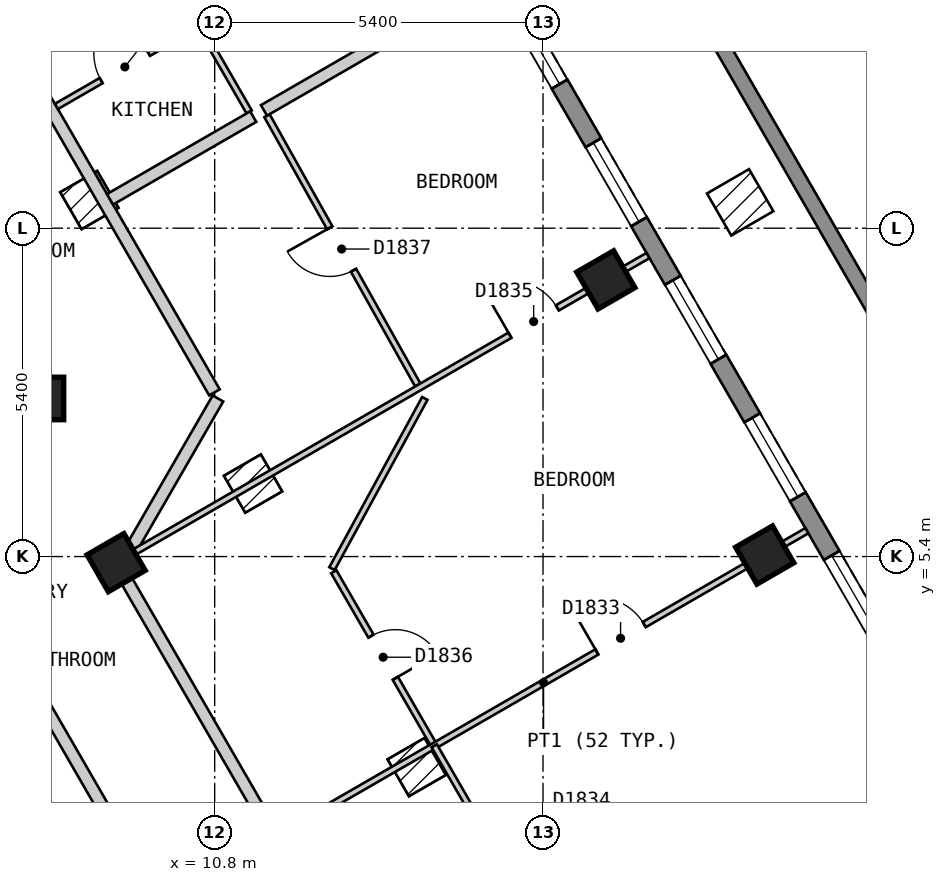
"""IFC4 building model, lengths in metres.
Left out: names, types, materials, properties, quantities, classifications, styles, units other than length and angle.
Written with IfcOpenShell. Run it as: python <this file> out.ifc"""

import sys

from ifc_helpers import new_model, si_unit, direction, frame, frame_2d, origin, origin_2d, place, context, subcontext, project, spatial, polyline, rectangle, outline, extrude, element, fill, save


model = new_model("IFC4")
c1 = context("Model", 3, precision=1e-05, world=origin(), true_north=direction((0.0, 1.0)))
c2 = subcontext(c1, "Body", "Model", "MODEL_VIEW")
j1 = project(units=[si_unit("LENGTHUNIT", "METRE"), si_unit("PLANEANGLEUNIT", "RADIAN")], contexts=[c1])
p1 = place(None, origin())
s1 = spatial("IfcSite", under=j1, at=p1, CompositionType="ELEMENT")
p2 = place(p1, origin())
s2 = spatial("IfcBuilding", under=s1, at=p2, CompositionType="ELEMENT")
p3 = place(p2, frame((0.0, 0.0, 202.8)))
s3 = spatial("IfcBuildingStorey", under=s2, at=p3, CompositionType="ELEMENT", Elevation=202.8)
for number, where, z_axis, x_axis in (
    (1, (19.846, 5.425, 0.0), (0.0, 0.0, 1.0), (-0.5, 0.866, 0.0)),
    (2, (17.233, 9.95, 0.0), (0.0, 0.0, 1.0), (-0.5, 0.866, 0.0)),
    (3, (9.179, 5.3, 0.0), (0.0, 0.0, 1.0), (-0.5, 0.866, 0.0)),
    (4, (7.967, 8.0, 0.0), (0.0, 0.0, 1.0), (1.0, 0.0, 0.0)),
):
    element("IfcColumn", number, at=place(p3, frame(where, z_axis=z_axis, x_axis=x_axis)), inside=s3, PredefinedType="COLUMN", context=c2, shape_type="SweptSolid", body=[
        extrude(rectangle(XDim=0.7, YDim=0.7, at=origin_2d()), origin(), (0.0, 0.0, 1.0), 3.0),
    ])
p4 = place(p3, frame((23.599, 0.825, 0.0), z_axis=(0.0, 0.0, 1.0), x_axis=(-0.500003656944, 0.866023292436, 0.0)))
e5 = element("IfcWall", 5, at=p4, inside=s3, PredefinedType="SOLIDWALL", context=c2, shape_type="SweptSolid", body=[
    extrude(outline(polyline([(0.0, -0.15), (22.17, -0.15), (22.09, 0.15), (0.08, 0.15), (0.0, -0.15)])), origin(), (0.0, 0.0, 1.0), 2.7),
])
p5 = place(p4, frame((1.191, 0.0, 0.15)))
e6 = element("IfcOpeningElement", 6, at=p5, cuts=e5, PredefinedType="OPENING", context=c2, shape_type="SweptSolid", body=[
    extrude(rectangle(XDim=1.5, YDim=2.1, at=frame_2d((0.75, 1.05))), frame((0.0, 0.16, 0.0), z_axis=(0.0, -1.0, 0.0), x_axis=(1.0, 0.0, 0.0)), (0.0, 0.0, 1.0), 0.32),
])
p6 = place(p4, frame((3.804, 0.0, 0.15)))
e7 = element("IfcOpeningElement", 7, at=p6, cuts=e5, PredefinedType="OPENING", context=c2, shape_type="SweptSolid", body=[
    extrude(rectangle(XDim=1.5, YDim=2.1, at=frame_2d((0.75, 1.05))), frame((0.0, 0.16, 0.0), z_axis=(0.0, -1.0, 0.0), x_axis=(1.0, 0.0, 0.0)), (0.0, 0.0, 1.0), 0.32),
])
p7 = place(p4, frame((6.417, 0.0, 0.15)))
e8 = element("IfcOpeningElement", 8, at=p7, cuts=e5, PredefinedType="OPENING", context=c2, shape_type="SweptSolid", body=[
    extrude(rectangle(XDim=1.5, YDim=2.1, at=frame_2d((0.75, 1.05))), frame((0.0, 0.16, 0.0), z_axis=(0.0, -1.0, 0.0), x_axis=(1.0, 0.0, 0.0)), (0.0, 0.0, 1.0), 0.32),
])
p8 = place(p4, frame((9.029, 0.0, 0.15)))
e9 = element("IfcOpeningElement", 9, at=p8, cuts=e5, PredefinedType="OPENING", context=c2, shape_type="SweptSolid", body=[
    extrude(rectangle(XDim=1.5, YDim=2.1, at=frame_2d((0.75, 1.05))), frame((0.0, 0.16, 0.0), z_axis=(0.0, -1.0, 0.0), x_axis=(1.0, 0.0, 0.0)), (0.0, 0.0, 1.0), 0.32),
])
p9 = place(p4, frame((11.641, 0.0, 0.15)))
e10 = element("IfcOpeningElement", 10, at=p9, cuts=e5, PredefinedType="OPENING", context=c2, shape_type="SweptSolid", body=[
    extrude(rectangle(XDim=1.5, YDim=2.1, at=frame_2d((0.75, 1.05))), frame((0.0, 0.16, 0.0), z_axis=(0.0, -1.0, 0.0), x_axis=(1.0, 0.0, 0.0)), (0.0, 0.0, 1.0), 0.32),
])
p10 = place(p4, frame((14.254, 0.0, 0.15)))
e11 = element("IfcOpeningElement", 11, at=p10, cuts=e5, PredefinedType="OPENING", context=c2, shape_type="SweptSolid", body=[
    extrude(rectangle(XDim=1.5, YDim=2.1, at=frame_2d((0.75, 1.05))), frame((0.0, 0.16, 0.0), z_axis=(0.0, -1.0, 0.0), x_axis=(1.0, 0.0, 0.0)), (0.0, 0.0, 1.0), 0.32),
])
p11 = place(p4, frame((16.866, 0.0, 0.15)))
e12 = element("IfcOpeningElement", 12, at=p11, cuts=e5, PredefinedType="OPENING", context=c2, shape_type="SweptSolid", body=[
    extrude(rectangle(XDim=1.5, YDim=2.1, at=frame_2d((0.75, 1.05))), frame((0.0, 0.16, 0.0), z_axis=(0.0, -1.0, 0.0), x_axis=(1.0, 0.0, 0.0)), (0.0, 0.0, 1.0), 0.32),
])
p12 = place(p4, frame((19.479, 0.0, 0.15)))
e13 = element("IfcOpeningElement", 13, at=p12, cuts=e5, PredefinedType="OPENING", context=c2, shape_type="SweptSolid", body=[
    extrude(rectangle(XDim=1.5, YDim=2.1, at=frame_2d((0.75, 1.05))), frame((0.0, 0.16, 0.0), z_axis=(0.0, -1.0, 0.0), x_axis=(1.0, 0.0, 0.0)), (0.0, 0.0, 1.0), 0.32),
])
p13 = place(p3, frame((14.613, 21.637, 0.0), z_axis=(0.0, 0.0, 1.0), x_axis=(0.500061067893, -0.865990143349, 0.0)))
e14 = element("IfcWall", 14, at=p13, inside=s3, PredefinedType="PARAPET", context=c2, shape_type="SweptSolid", body=[
    extrude(outline(polyline([(0.067, -0.125), (22.796, -0.125), (22.863, 0.125), (0.0, 0.125), (0.067, -0.125)])), origin(), (0.0, 0.0, 1.0), 1.6),
])
p14 = place(p3, frame((8.026, 2.899, 0.0), z_axis=(0.0, 0.0, 1.0), x_axis=(0.499986018985, -0.866033475577, 0.0)))
e15 = element("IfcWall", 15, at=p14, inside=s3, PredefinedType="PARTITIONING", context=c2, shape_type="SweptSolid", body=[
    extrude(rectangle(XDim=5.078, YDim=0.2, at=frame_2d((2.539, 0.0))), origin(), (0.0, 0.0, 1.0), 2.7),
])
p15 = place(p14, frame((2.089, 0.0, 0.0)))
e16 = element("IfcOpeningElement", 16, at=p15, cuts=e15, PredefinedType="OPENING", context=c2, shape_type="SweptSolid", body=[
    extrude(rectangle(XDim=0.9, YDim=2.1, at=frame_2d((0.45, 1.05))), frame((0.0, 0.11, 0.0), z_axis=(0.0, -1.0, 0.0), x_axis=(1.0, 0.0, 0.0)), (0.0, 0.0, 1.0), 0.22),
])
p16 = place(p3, frame((9.238, 5.2, 0.0), z_axis=(0.0, 0.0, 1.0), x_axis=(0.500025705601, -0.86601056214, 0.0)))
e17 = element("IfcWall", 17, at=p16, inside=s3, PredefinedType="PARTITIONING", context=c2, shape_type="SweptSolid", body=[
    extrude(rectangle(XDim=7.735, YDim=0.2, at=frame_2d((3.868, 0.0))), origin(), (0.0, 0.0, 1.0), 2.7),
])
p17 = place(p3, frame((5.485, 17.3, 0.0), z_axis=(0.0, 0.0, 1.0), x_axis=(0.499943285704, -0.866058145322, 0.0)))
e18 = element("IfcWall", 18, at=p17, inside=s3, PredefinedType="PARTITIONING", context=c2, shape_type="SweptSolid", body=[
    extrude(rectangle(XDim=10.623, YDim=0.2, at=frame_2d((5.312, 0.0))), origin(), (0.0, 0.0, 1.0), 2.7),
])
p18 = place(p17, frame((3.901, 0.0, 0.0)))
e19 = element("IfcOpeningElement", 19, at=p18, cuts=e18, PredefinedType="OPENING", context=c2, shape_type="SweptSolid", body=[
    extrude(rectangle(XDim=1.0, YDim=2.1, at=frame_2d((0.5, 1.05))), frame((0.0, 0.11, 0.0), z_axis=(0.0, -1.0, 0.0), x_axis=(1.0, 0.0, 0.0)), (0.0, 0.0, 1.0), 0.22),
])
p19 = place(p3, frame((9.404, 5.487, 0.0), z_axis=(0.0, 0.0, 1.0), x_axis=(0.499768590677, 0.866158966803, 0.0)))
e20 = element("IfcWall", 20, at=p19, inside=s3, PredefinedType="PARTITIONING", context=c2, shape_type="SweptSolid", body=[
    extrude(rectangle(XDim=2.901, YDim=0.2, at=frame_2d((1.451, 0.0))), origin(), (0.0, 0.0, 1.0), 2.7),
])
p20 = place(p3, frame((12.759, 5.15, 0.0), z_axis=(0.0, 0.0, 1.0), x_axis=(0.499905801698, -0.866079782369, 0.0)))
e21 = element("IfcWall", 21, at=p20, inside=s3, PredefinedType="PARTITIONING", context=c2, shape_type="SweptSolid", body=[
    extrude(rectangle(XDim=3.304, YDim=0.1, at=frame_2d((1.652, 0.0))), origin(), (0.0, 0.0, 1.0), 2.7),
])
p21 = place(p20, frame((1.223, 0.0, 0.0)))
e22 = element("IfcOpeningElement", 22, at=p21, cuts=e21, PredefinedType="OPENING", context=c2, shape_type="SweptSolid", body=[
    extrude(rectangle(XDim=0.8, YDim=2.1, at=frame_2d((0.4, 1.05))), frame((0.0, 0.06, 0.0), z_axis=(0.0, -1.0, 0.0), x_axis=(1.0, 0.0, 0.0)), (0.0, 0.0, 1.0), 0.12),
])
p22 = place(p3, frame((8.854, 17.064, 0.0), z_axis=(0.0, 0.0, 1.0), x_axis=(0.500042049778, -0.866001124973, 0.0)))
e23 = element("IfcWall", 23, at=p22, inside=s3, PredefinedType="PARTITIONING", context=c2, shape_type="SweptSolid", body=[
    extrude(rectangle(XDim=5.025, YDim=0.1, at=frame_2d((2.513, 0.0))), origin(), (0.0, 0.0, 1.0), 2.7),
])
p23 = place(p22, frame((2.063, 0.0, 0.0)))
e24 = element("IfcOpeningElement", 24, at=p23, cuts=e23, PredefinedType="OPENING", context=c2, shape_type="SweptSolid", body=[
    extrude(rectangle(XDim=0.9, YDim=2.1, at=frame_2d((0.45, 1.05))), frame((0.0, 0.06, 0.0), z_axis=(0.0, -1.0, 0.0), x_axis=(1.0, 0.0, 0.0)), (0.0, 0.0, 1.0), 0.12),
])
p24 = place(p3, frame((11.66, 12.65, 0.0), z_axis=(0.0, 0.0, 1.0), x_axis=(0.488650242737, -0.872479764965, 0.0)))
e25 = element("IfcWall", 25, at=p24, inside=s3, PredefinedType="PARTITIONING", context=c2, shape_type="SweptSolid", body=[
    extrude(rectangle(XDim=5.075, YDim=0.1, at=frame_2d((2.538, 0.0))), origin(), (0.0, 0.0, 1.0), 2.7),
])
p25 = place(p24, frame((2.113, 0.0, 0.0)))
e26 = element("IfcOpeningElement", 26, at=p25, cuts=e25, PredefinedType="OPENING", context=c2, shape_type="SweptSolid", body=[
    extrude(rectangle(XDim=0.8, YDim=2.1, at=frame_2d((0.4, 1.05))), frame((0.0, 0.06, 0.0), z_axis=(0.0, -1.0, 0.0), x_axis=(1.0, 0.0, 0.0)), (0.0, 0.0, 1.0), 0.12),
])
p26 = place(p3, frame((12.729, 5.201, 0.0), z_axis=(0.0, 0.0, 1.0), x_axis=(0.478932598182, 0.877851676764, 0.0)))
e27 = element("IfcWall", 27, at=p26, inside=s3, PredefinedType="PARTITIONING", context=c2, shape_type="SweptSolid", body=[
    extrude(rectangle(XDim=3.188, YDim=0.1, at=frame_2d((1.594, 0.0))), origin(), (0.0, 0.0, 1.0), 2.7),
])
p27 = place(p3, frame((11.879, 0.826, 0.0), z_axis=(0.0, 0.0, 1.0), x_axis=(0.866065245018, 0.499930986609, 0.0)))
e28 = element("IfcWall", 28, at=p27, inside=s3, PredefinedType="PARTITIONING", context=c2, shape_type="SweptSolid", body=[
    extrude(rectangle(XDim=10.0, YDim=0.1, at=frame_2d((5.0, 0.0))), origin(), (0.0, 0.0, 1.0), 2.7),
])
p28 = place(p27, frame((6.012, 0.0, 0.0)))
e29 = element("IfcOpeningElement", 29, at=p28, cuts=e28, PredefinedType="OPENING", context=c2, shape_type="SweptSolid", body=[
    extrude(rectangle(XDim=0.9, YDim=2.1, at=frame_2d((0.45, 1.05))), frame((0.0, 0.06, 0.0), z_axis=(0.0, -1.0, 0.0), x_axis=(1.0, 0.0, 0.0)), (0.0, 0.0, 1.0), 0.12),
])
p29 = place(p3, frame((9.354, 5.401, 0.0), z_axis=(0.0, 0.0, 1.0), x_axis=(0.866018411306, 0.500012111133, 0.0)))
e30 = element("IfcWall", 30, at=p29, inside=s3, PredefinedType="PARTITIONING", context=c2, shape_type="SweptSolid", body=[
    extrude(rectangle(XDim=9.898, YDim=0.1, at=frame_2d((4.949, 0.0))), origin(), (0.0, 0.0, 1.0), 2.7),
])
p30 = place(p29, frame((7.277, 0.0, 0.0)))
e31 = element("IfcOpeningElement", 31, at=p30, cuts=e30, PredefinedType="OPENING", context=c2, shape_type="SweptSolid", body=[
    extrude(rectangle(XDim=0.9, YDim=2.1, at=frame_2d((0.45, 1.05))), frame((0.0, 0.06, 0.0), z_axis=(0.0, -1.0, 0.0), x_axis=(1.0, 0.0, 0.0)), (0.0, 0.0, 1.0), 0.12),
])
p31 = place(p3, frame((8.197, 12.802, 0.0), z_axis=(0.0, 0.0, 1.0), x_axis=(0.866029095148, 0.499993606316, 0.0)))
e32 = element("IfcWall", 32, at=p31, inside=s3, PredefinedType="PARTITIONING", context=c2, shape_type="SweptSolid", body=[
    extrude(rectangle(XDim=2.65, YDim=0.1, at=frame_2d((1.325, 0.0))), origin(), (0.0, 0.0, 1.0), 2.7),
])
p32 = place(p31, frame((0.85, 0.0, 0.0)))
e33 = element("IfcOpeningElement", 33, at=p32, cuts=e32, PredefinedType="OPENING", context=c2, shape_type="SweptSolid", body=[
    extrude(rectangle(XDim=0.9, YDim=2.1, at=frame_2d((0.45, 1.05))), frame((0.0, 0.06, 0.0), z_axis=(0.0, -1.0, 0.0), x_axis=(1.0, 0.0, 0.0)), (0.0, 0.0, 1.0), 0.12),
])
p33 = place(p3, frame((9.079, 11.275, 0.0), z_axis=(0.0, 0.0, 1.0), x_axis=(0.865952340496, 0.500126527981, 0.0)))
e34 = element("IfcWall", 34, at=p33, inside=s3, PredefinedType="PARTITIONING", context=c2, shape_type="SweptSolid", body=[
    extrude(rectangle(XDim=2.719, YDim=0.2, at=frame_2d((1.36, 0.0))), origin(), (0.0, 0.0, 1.0), 2.7),
])
p34 = place(p3, frame((11.611, 12.737, 0.0), z_axis=(0.0, 0.0, 1.0), x_axis=(0.866017282483, 0.500014066243, 0.0)))
e35 = element("IfcWall", 35, at=p34, inside=s3, PredefinedType="PARTITIONING", context=c2, shape_type="SweptSolid", body=[
    extrude(rectangle(XDim=4.276, YDim=0.2, at=frame_2d((2.138, 0.0))), origin(), (0.0, 0.0, 1.0), 2.7),
])
p35 = place(p3, frame((14.411, 2.288, 0.0), z_axis=(0.0, 0.0, 1.0), x_axis=(0.500009005995, -0.866020204108, 0.0)))
e36 = element("IfcWall", 36, at=p35, inside=s3, PredefinedType="PARTITIONING", context=c2, shape_type="SweptSolid", body=[
    extrude(rectangle(XDim=1.696, YDim=0.1, at=frame_2d((0.848, 0.0))), origin(), (0.0, 0.0, 1.0), 2.7),
])
p36 = place(p6, origin())
e37 = element("IfcWindow", 37, at=p36, inside=s3, PartitioningType="SINGLE_PANEL", PredefinedType="WINDOW", context=c2, shape_type="SweptSolid", body=[
    extrude(rectangle(XDim=1.5, YDim=2.1, at=frame_2d((0.75, 1.05))), frame((0.0, 0.03, 0.0), z_axis=(0.0, -1.0, 0.0), x_axis=(1.0, 0.0, 0.0)), (0.0, 0.0, 1.0), 0.06),
])
fill(e7, e37)
p37 = place(p7, origin())
e38 = element("IfcWindow", 38, at=p37, inside=s3, PartitioningType="SINGLE_PANEL", PredefinedType="WINDOW", context=c2, shape_type="SweptSolid", body=[
    extrude(rectangle(XDim=1.5, YDim=2.1, at=frame_2d((0.75, 1.05))), frame((0.0, 0.03, 0.0), z_axis=(0.0, -1.0, 0.0), x_axis=(1.0, 0.0, 0.0)), (0.0, 0.0, 1.0), 0.06),
])
fill(e8, e38)
p38 = place(p8, origin())
e39 = element("IfcWindow", 39, at=p38, inside=s3, PartitioningType="SINGLE_PANEL", PredefinedType="WINDOW", context=c2, shape_type="SweptSolid", body=[
    extrude(rectangle(XDim=1.5, YDim=2.1, at=frame_2d((0.75, 1.05))), frame((0.0, 0.03, 0.0), z_axis=(0.0, -1.0, 0.0), x_axis=(1.0, 0.0, 0.0)), (0.0, 0.0, 1.0), 0.06),
])
fill(e9, e39)
p39 = place(p9, origin())
e40 = element("IfcWindow", 40, at=p39, inside=s3, PartitioningType="SINGLE_PANEL", PredefinedType="WINDOW", context=c2, shape_type="SweptSolid", body=[
    extrude(rectangle(XDim=1.5, YDim=2.1, at=frame_2d((0.75, 1.05))), frame((0.0, 0.03, 0.0), z_axis=(0.0, -1.0, 0.0), x_axis=(1.0, 0.0, 0.0)), (0.0, 0.0, 1.0), 0.06),
])
fill(e10, e40)
p40 = place(p10, origin())
e41 = element("IfcWindow", 41, at=p40, inside=s3, PartitioningType="SINGLE_PANEL", PredefinedType="WINDOW", context=c2, shape_type="SweptSolid", body=[
    extrude(rectangle(XDim=1.5, YDim=2.1, at=frame_2d((0.75, 1.05))), frame((0.0, 0.03, 0.0), z_axis=(0.0, -1.0, 0.0), x_axis=(1.0, 0.0, 0.0)), (0.0, 0.0, 1.0), 0.06),
])
fill(e11, e41)
p41 = place(p28, origin())
e42 = element("IfcDoor", 42, at=p41, inside=s3, OperationType="SINGLE_SWING_LEFT", PredefinedType="DOOR", context=c2, shape_type="SweptSolid", body=[
    extrude(rectangle(XDim=0.9, YDim=2.1, at=frame_2d((0.45, 1.05))), frame((0.0, 0.025, 0.0), z_axis=(0.0, -1.0, 0.0), x_axis=(1.0, 0.0, 0.0)), (0.0, 0.0, 1.0), 0.05),
])
fill(e29, e42)
p42 = place(p30, origin())
e43 = element("IfcDoor", 43, at=p42, inside=s3, OperationType="SINGLE_SWING_LEFT", PredefinedType="DOOR", context=c2, shape_type="SweptSolid", body=[
    extrude(rectangle(XDim=0.9, YDim=2.1, at=frame_2d((0.45, 1.05))), frame((0.0, 0.025, 0.0), z_axis=(0.0, -1.0, 0.0), x_axis=(1.0, 0.0, 0.0)), (0.0, 0.0, 1.0), 0.05),
])
fill(e31, e43)
p43 = place(p21, origin())
e44 = element("IfcDoor", 44, at=p43, inside=s3, OperationType="SINGLE_SWING_RIGHT", PredefinedType="DOOR", context=c2, shape_type="SweptSolid", body=[
    extrude(rectangle(XDim=0.8, YDim=2.1, at=frame_2d((0.4, 1.05))), frame((0.0, 0.025, 0.0), z_axis=(0.0, -1.0, 0.0), x_axis=(1.0, 0.0, 0.0)), (0.0, 0.0, 1.0), 0.05),
])
fill(e22, e44)
p44 = place(p25, origin())
e45 = element("IfcDoor", 45, at=p44, inside=s3, OperationType="SINGLE_SWING_LEFT", PredefinedType="DOOR", context=c2, shape_type="SweptSolid", body=[
    extrude(rectangle(XDim=0.8, YDim=2.1, at=frame_2d((0.4, 1.05))), frame((0.0, 0.025, 0.0), z_axis=(0.0, -1.0, 0.0), x_axis=(1.0, 0.0, 0.0)), (0.0, 0.0, 1.0), 0.05),
])
fill(e26, e45)
p45 = place(p32, origin())
e46 = element("IfcDoor", 46, at=p45, inside=s3, OperationType="SINGLE_SWING_RIGHT", PredefinedType="DOOR", context=c2, shape_type="SweptSolid", body=[
    extrude(rectangle(XDim=0.9, YDim=2.1, at=frame_2d((0.45, 1.05))), frame((0.0, 0.025, 0.0), z_axis=(0.0, -1.0, 0.0), x_axis=(1.0, 0.0, 0.0)), (0.0, 0.0, 1.0), 0.05),
])
fill(e33, e46)
save(model, sys.argv[1])
